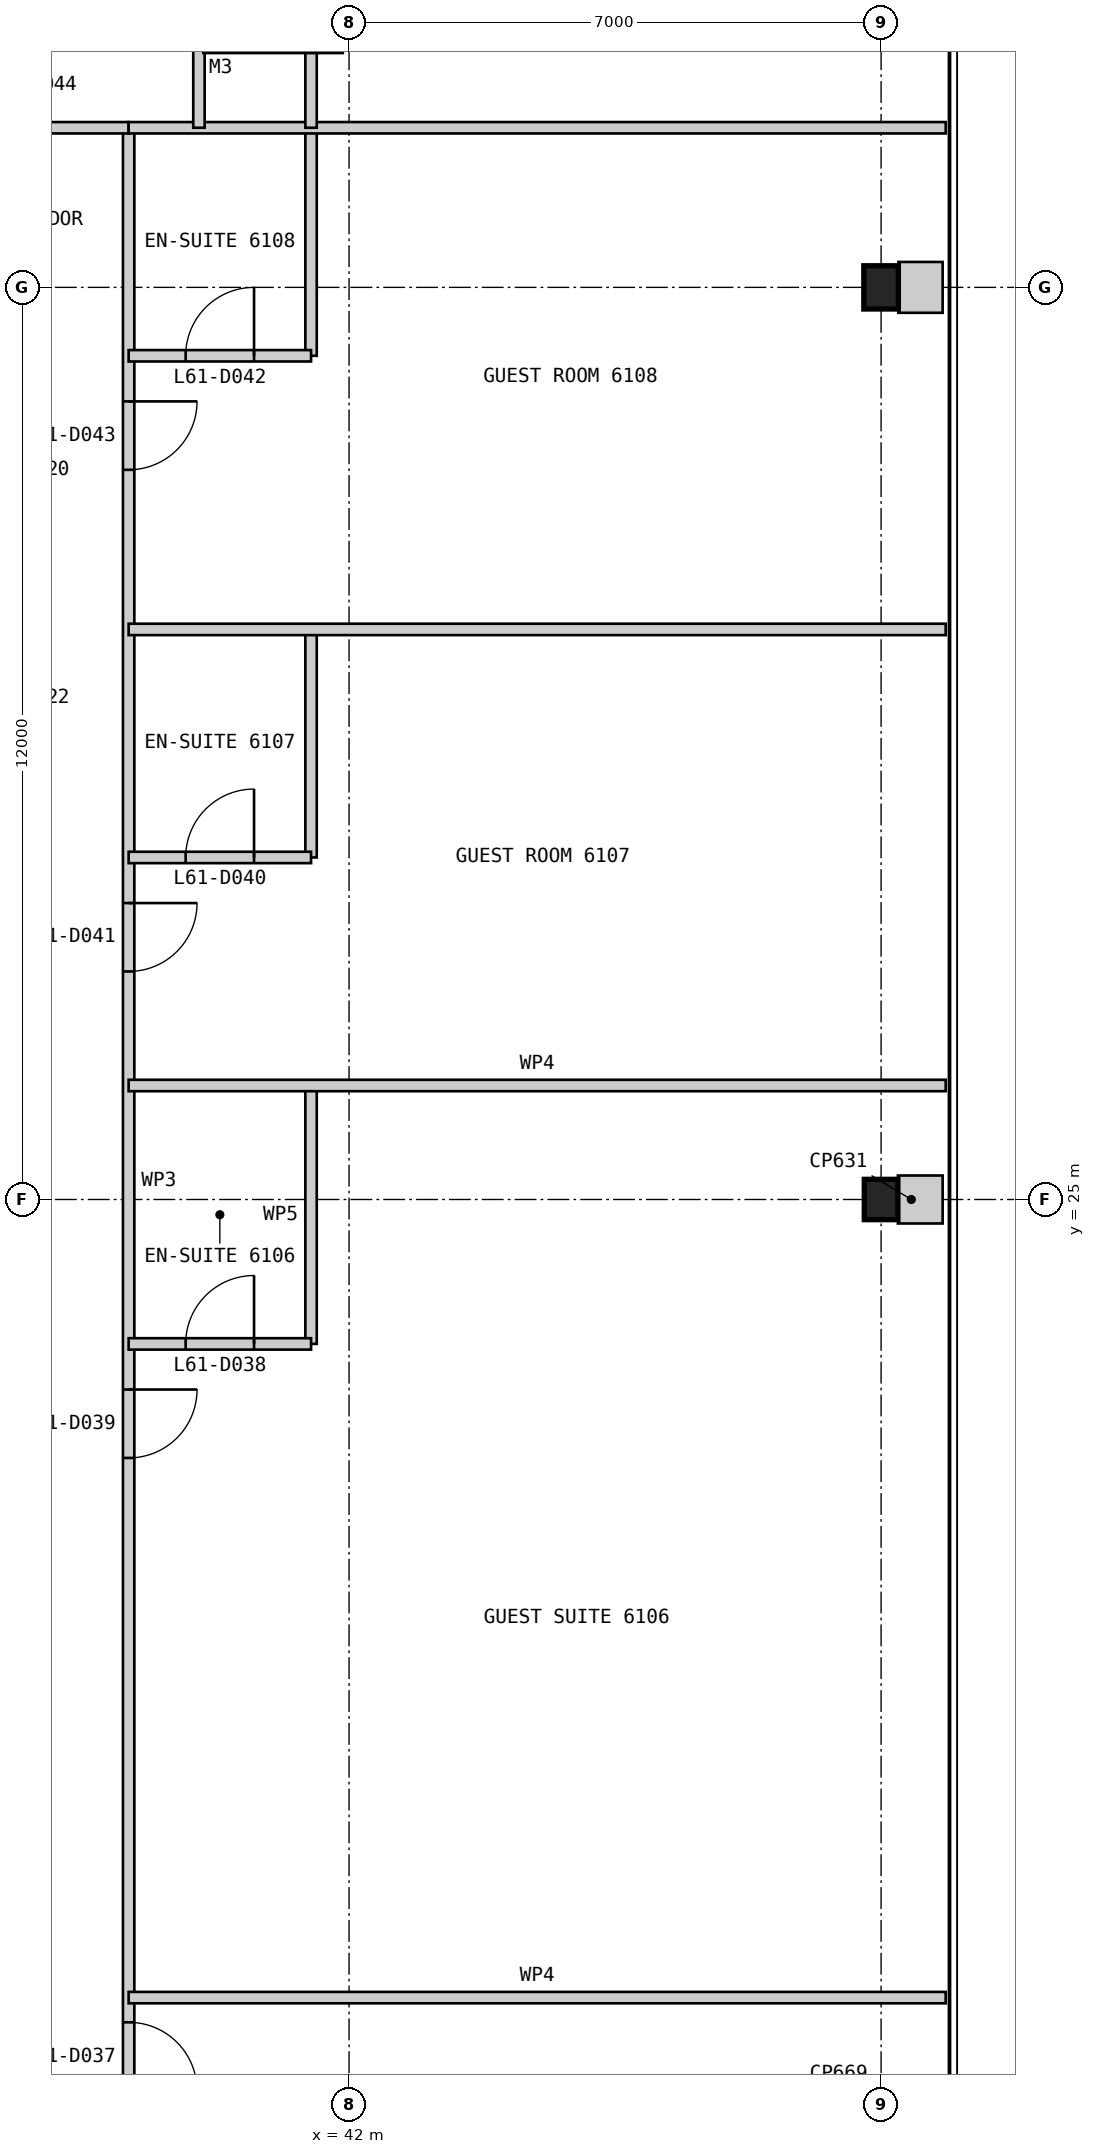
"""IFC4 building model, lengths in metres.
Left out: names, types, materials, properties, quantities, classifications, styles, units other than length and angle.
Written with IfcOpenShell. Run it as: python <this file> out.ifc"""

import sys

from ifc_helpers import new_model, si_unit, direction, frame, frame_2d, origin, origin_2d, place, context, subcontext, project, spatial, rectangle, i_section, extrude, element, fill, save


model = new_model("IFC4")
c1 = context("Model", 3, precision=1e-05, world=origin(), true_north=direction((0.0, 1.0)))
c2 = subcontext(c1, "Body", "Model", "MODEL_VIEW")
j1 = project(units=[si_unit("LENGTHUNIT", "METRE"), si_unit("PLANEANGLEUNIT", "RADIAN")], contexts=[c1])
p1 = place(None, origin())
s1 = spatial("IfcSite", under=j1, at=p1, CompositionType="ELEMENT")
p2 = place(p1, origin())
s2 = spatial("IfcBuilding", under=s1, at=p2, CompositionType="ELEMENT")
p3 = place(p2, frame((0.0, 0.0, 259.4)))
s3 = spatial("IfcBuildingStorey", under=s2, at=p3, CompositionType="ELEMENT", Elevation=259.4)
p4 = place(p3, frame((41.0, 41.0, 0.0), z_axis=(0.0, 0.0, 1.0), x_axis=(1.0, 0.0, 0.0)))
e1 = element("IfcColumn", 1, at=p4, inside=s3, PredefinedType="COLUMN", context=c2, shape_type="SweptSolid", body=[
    extrude(rectangle(XDim=1.8, YDim=1.8, at=origin_2d()), origin(), (0.0, 0.0, 1.0), 3.4),
])
p5 = place(p3, frame((49.0, 25.0, 0.0), z_axis=(0.0, 0.0, 1.0), x_axis=(1.0, 0.0, 0.0)))
e2 = element("IfcColumn", 2, at=p5, inside=s3, PredefinedType="COLUMN", context=c2, shape_type="SweptSolid", body=[
    extrude(i_section(OverallWidth=0.442, OverallDepth=0.531, WebThickness=0.066, FlangeThickness=0.106, at=origin_2d()), origin(), (0.0, 0.0, 1.0), 3.4),
])
p6 = place(p3, frame((49.0, 37.0, 0.0), z_axis=(0.0, 0.0, 1.0), x_axis=(1.0, 0.0, 0.0)))
e3 = element("IfcColumn", 3, at=p6, inside=s3, PredefinedType="COLUMN", context=c2, shape_type="SweptSolid", body=[
    extrude(i_section(OverallWidth=0.455, OverallDepth=0.569, WebThickness=0.078, FlangeThickness=0.125, at=origin_2d()), origin(), (0.0, 0.0, 1.0), 3.4),
])
p7 = place(p3, frame((39.1, 10.9, 0.0), z_axis=(0.0, 0.0, 1.0), x_axis=(0.0, 1.0, 0.0)))
e4 = element("IfcWall", 4, at=p7, inside=s3, PredefinedType="PARTITIONING", context=c2, shape_type="SweptSolid", body=[
    extrude(rectangle(XDim=28.2, YDim=0.15, at=frame_2d((14.1, 0.0))), origin(), (0.0, 0.0, 1.0), 3.25),
])
p8 = place(p7, frame((2.375, 0.0, 0.0)))
e5 = element("IfcOpeningElement", 5, at=p8, cuts=e4, PredefinedType="OPENING", context=c2, shape_type="SweptSolid", body=[
    extrude(rectangle(XDim=0.9, YDim=2.1, at=frame_2d((0.45, 1.05))), frame((0.0, 0.085, 0.0), z_axis=(0.0, -1.0, 0.0), x_axis=(1.0, 0.0, 0.0)), (0.0, 0.0, 1.0), 0.17),
])
p9 = place(p7, frame((10.7, 0.0, 0.0)))
e6 = element("IfcOpeningElement", 6, at=p9, cuts=e4, PredefinedType="OPENING", context=c2, shape_type="SweptSolid", body=[
    extrude(rectangle(XDim=0.9, YDim=2.1, at=frame_2d((0.45, 1.05))), frame((0.0, 0.085, 0.0), z_axis=(0.0, -1.0, 0.0), x_axis=(1.0, 0.0, 0.0)), (0.0, 0.0, 1.0), 0.17),
])
p10 = place(p7, frame((17.1, 0.0, 0.0)))
e7 = element("IfcOpeningElement", 7, at=p10, cuts=e4, PredefinedType="OPENING", context=c2, shape_type="SweptSolid", body=[
    extrude(rectangle(XDim=0.9, YDim=2.1, at=frame_2d((0.45, 1.05))), frame((0.0, 0.085, 0.0), z_axis=(0.0, -1.0, 0.0), x_axis=(1.0, 0.0, 0.0)), (0.0, 0.0, 1.0), 0.17),
])
p11 = place(p7, frame((23.7, 0.0, 0.0)))
e8 = element("IfcOpeningElement", 8, at=p11, cuts=e4, PredefinedType="OPENING", context=c2, shape_type="SweptSolid", body=[
    extrude(rectangle(XDim=0.9, YDim=2.1, at=frame_2d((0.45, 1.05))), frame((0.0, 0.085, 0.0), z_axis=(0.0, -1.0, 0.0), x_axis=(1.0, 0.0, 0.0)), (0.0, 0.0, 1.0), 0.17),
])
p12 = place(p3, frame((49.85, 14.5, 0.0), z_axis=(0.0, 0.0, 1.0), x_axis=(-1.0, 0.0, 0.0)))
e9 = element("IfcWall", 9, at=p12, inside=s3, PredefinedType="PARTITIONING", context=c2, shape_type="SweptSolid", body=[
    extrude(rectangle(XDim=10.75, YDim=0.15, at=frame_2d((5.375, 0.0))), origin(), (0.0, 0.0, 1.0), 3.25),
])
p13 = place(p3, frame((41.5, 23.1, 0.0), z_axis=(0.0, 0.0, 1.0), x_axis=(0.0, 1.0, 0.0)))
e10 = element("IfcWall", 10, at=p13, inside=s3, PredefinedType="PARTITIONING", context=c2, shape_type="SweptSolid", body=[
    extrude(rectangle(XDim=3.4, YDim=0.15, at=frame_2d((1.7, 0.0))), origin(), (0.0, 0.0, 1.0), 3.25),
])
p14 = place(p3, frame((41.5, 23.1, 0.0), z_axis=(0.0, 0.0, 1.0), x_axis=(-1.0, 0.0, 0.0)))
e11 = element("IfcWall", 11, at=p14, inside=s3, PredefinedType="PARTITIONING", context=c2, shape_type="SweptSolid", body=[
    extrude(rectangle(XDim=2.4, YDim=0.15, at=frame_2d((1.2, 0.0))), origin(), (0.0, 0.0, 1.0), 3.25),
])
p15 = place(p14, frame((0.75, 0.0, 0.0)))
e12 = element("IfcOpeningElement", 12, at=p15, cuts=e11, PredefinedType="OPENING", context=c2, shape_type="SweptSolid", body=[
    extrude(rectangle(XDim=0.9, YDim=2.1, at=frame_2d((0.45, 1.05))), frame((0.0, 0.085, 0.0), z_axis=(0.0, -1.0, 0.0), x_axis=(1.0, 0.0, 0.0)), (0.0, 0.0, 1.0), 0.17),
])
p16 = place(p3, frame((49.85, 26.5, 0.0), z_axis=(0.0, 0.0, 1.0), x_axis=(-1.0, 0.0, 0.0)))
e13 = element("IfcWall", 13, at=p16, inside=s3, PredefinedType="PARTITIONING", context=c2, shape_type="SweptSolid", body=[
    extrude(rectangle(XDim=10.75, YDim=0.15, at=frame_2d((5.375, 0.0))), origin(), (0.0, 0.0, 1.0), 3.25),
])
p17 = place(p3, frame((41.5, 29.5, 0.0), z_axis=(0.0, 0.0, 1.0), x_axis=(0.0, 1.0, 0.0)))
e14 = element("IfcWall", 14, at=p17, inside=s3, PredefinedType="PARTITIONING", context=c2, shape_type="SweptSolid", body=[
    extrude(rectangle(XDim=3.0, YDim=0.15, at=frame_2d((1.5, 0.0))), origin(), (0.0, 0.0, 1.0), 3.25),
])
p18 = place(p3, frame((41.5, 29.5, 0.0), z_axis=(0.0, 0.0, 1.0), x_axis=(-1.0, 0.0, 0.0)))
e15 = element("IfcWall", 15, at=p18, inside=s3, PredefinedType="PARTITIONING", context=c2, shape_type="SweptSolid", body=[
    extrude(rectangle(XDim=2.4, YDim=0.15, at=frame_2d((1.2, 0.0))), origin(), (0.0, 0.0, 1.0), 3.25),
])
p19 = place(p18, frame((0.75, 0.0, 0.0)))
e16 = element("IfcOpeningElement", 16, at=p19, cuts=e15, PredefinedType="OPENING", context=c2, shape_type="SweptSolid", body=[
    extrude(rectangle(XDim=0.9, YDim=2.1, at=frame_2d((0.45, 1.05))), frame((0.0, 0.085, 0.0), z_axis=(0.0, -1.0, 0.0), x_axis=(1.0, 0.0, 0.0)), (0.0, 0.0, 1.0), 0.17),
])
p20 = place(p3, frame((49.85, 32.5, 0.0), z_axis=(0.0, 0.0, 1.0), x_axis=(-1.0, 0.0, 0.0)))
e17 = element("IfcWall", 17, at=p20, inside=s3, PredefinedType="PARTITIONING", context=c2, shape_type="SweptSolid", body=[
    extrude(rectangle(XDim=10.75, YDim=0.15, at=frame_2d((5.375, 0.0))), origin(), (0.0, 0.0, 1.0), 3.25),
])
p21 = place(p3, frame((41.5, 36.1, 0.0), z_axis=(0.0, 0.0, 1.0), x_axis=(0.0, 1.0, 0.0)))
e18 = element("IfcWall", 18, at=p21, inside=s3, PredefinedType="PARTITIONING", context=c2, shape_type="SweptSolid", body=[
    extrude(rectangle(XDim=3.0, YDim=0.15, at=frame_2d((1.5, 0.0))), origin(), (0.0, 0.0, 1.0), 3.25),
])
p22 = place(p3, frame((41.5, 36.1, 0.0), z_axis=(0.0, 0.0, 1.0), x_axis=(-1.0, 0.0, 0.0)))
e19 = element("IfcWall", 19, at=p22, inside=s3, PredefinedType="PARTITIONING", context=c2, shape_type="SweptSolid", body=[
    extrude(rectangle(XDim=2.4, YDim=0.15, at=frame_2d((1.2, 0.0))), origin(), (0.0, 0.0, 1.0), 3.25),
])
p23 = place(p22, frame((0.75, 0.0, 0.0)))
e20 = element("IfcOpeningElement", 20, at=p23, cuts=e19, PredefinedType="OPENING", context=c2, shape_type="SweptSolid", body=[
    extrude(rectangle(XDim=0.9, YDim=2.1, at=frame_2d((0.45, 1.05))), frame((0.0, 0.085, 0.0), z_axis=(0.0, -1.0, 0.0), x_axis=(1.0, 0.0, 0.0)), (0.0, 0.0, 1.0), 0.17),
])
p24 = place(p3, frame((39.1, 39.1, 0.0), z_axis=(0.0, 0.0, 1.0), x_axis=(-1.0, 0.0, 0.0)))
e21 = element("IfcWall", 21, at=p24, inside=s3, PredefinedType="PARTITIONING", context=c2, shape_type="SweptSolid", body=[
    extrude(rectangle(XDim=28.2, YDim=0.15, at=frame_2d((14.1, 0.0))), origin(), (0.0, 0.0, 1.0), 3.25),
])
p25 = place(p24, frame((2.375, 0.0, 0.0)))
e22 = element("IfcOpeningElement", 22, at=p25, cuts=e21, PredefinedType="OPENING", context=c2, shape_type="SweptSolid", body=[
    extrude(rectangle(XDim=0.9, YDim=2.1, at=frame_2d((0.45, 1.05))), frame((0.0, 0.085, 0.0), z_axis=(0.0, -1.0, 0.0), x_axis=(1.0, 0.0, 0.0)), (0.0, 0.0, 1.0), 0.17),
])
p26 = place(p24, frame((10.7, 0.0, 0.0)))
e23 = element("IfcOpeningElement", 23, at=p26, cuts=e21, PredefinedType="OPENING", context=c2, shape_type="SweptSolid", body=[
    extrude(rectangle(XDim=0.9, YDim=2.1, at=frame_2d((0.45, 1.05))), frame((0.0, 0.085, 0.0), z_axis=(0.0, -1.0, 0.0), x_axis=(1.0, 0.0, 0.0)), (0.0, 0.0, 1.0), 0.17),
])
p27 = place(p24, frame((17.1, 0.0, 0.0)))
e24 = element("IfcOpeningElement", 24, at=p27, cuts=e21, PredefinedType="OPENING", context=c2, shape_type="SweptSolid", body=[
    extrude(rectangle(XDim=0.9, YDim=2.1, at=frame_2d((0.45, 1.05))), frame((0.0, 0.085, 0.0), z_axis=(0.0, -1.0, 0.0), x_axis=(1.0, 0.0, 0.0)), (0.0, 0.0, 1.0), 0.17),
])
p28 = place(p24, frame((23.4, 0.0, 0.0)))
e25 = element("IfcOpeningElement", 25, at=p28, cuts=e21, PredefinedType="OPENING", context=c2, shape_type="SweptSolid", body=[
    extrude(rectangle(XDim=1.0, YDim=2.1, at=frame_2d((0.5, 1.05))), frame((0.0, 0.085, 0.0), z_axis=(0.0, -1.0, 0.0), x_axis=(1.0, 0.0, 0.0)), (0.0, 0.0, 1.0), 0.17),
])
p29 = place(p3, frame((49.85, 39.1, 0.0), z_axis=(0.0, 0.0, 1.0), x_axis=(-1.0, 0.0, 0.0)))
e26 = element("IfcWall", 26, at=p29, inside=s3, PredefinedType="PARTITIONING", context=c2, shape_type="SweptSolid", body=[
    extrude(rectangle(XDim=10.75, YDim=0.15, at=frame_2d((5.375, 0.0))), origin(), (0.0, 0.0, 1.0), 3.25),
])
p30 = place(p3, frame((40.025, 41.5, 0.0), z_axis=(0.0, 0.0, 1.0), x_axis=(0.0, -1.0, 0.0)))
e27 = element("IfcWall", 27, at=p30, inside=s3, PredefinedType="PARTITIONING", context=c2, shape_type="SweptSolid", body=[
    extrude(rectangle(XDim=2.4, YDim=0.15, at=frame_2d((1.2, 0.0))), origin(), (0.0, 0.0, 1.0), 3.25),
])
p31 = place(p3, frame((41.5, 49.85, 0.0), z_axis=(0.0, 0.0, 1.0), x_axis=(0.0, -1.0, 0.0)))
e28 = element("IfcWall", 28, at=p31, inside=s3, PredefinedType="PARTITIONING", context=c2, shape_type="SweptSolid", body=[
    extrude(rectangle(XDim=10.75, YDim=0.15, at=frame_2d((5.375, 0.0))), origin(), (0.0, 0.0, 1.0), 3.25),
])
p32 = place(p31, frame((5.0, 0.0, 0.0)))
e29 = element("IfcOpeningElement", 29, at=p32, cuts=e28, PredefinedType="OPENING", context=c2, shape_type="SweptSolid", body=[
    extrude(rectangle(XDim=0.9, YDim=2.1, at=frame_2d((0.45, 1.05))), frame((0.0, 0.085, 0.0), z_axis=(0.0, -1.0, 0.0), x_axis=(1.0, 0.0, 0.0)), (0.0, 0.0, 1.0), 0.17),
])
p33 = place(p3, frame((49.81, 25.0, 0.0), z_axis=(0.0, 0.0, 1.0), x_axis=(-1.0, 0.0, 0.0)))
e30 = element("IfcWall", 30, at=p33, inside=s3, PredefinedType="PARTITIONING", context=c2, shape_type="SweptSolid", body=[
    extrude(rectangle(XDim=0.589, YDim=0.631, at=frame_2d((0.294, 0.0))), origin(), (0.0, 0.0, 1.0), 3.25),
])
p34 = place(p3, frame((49.81, 37.0, 0.0), z_axis=(0.0, 0.0, 1.0), x_axis=(-1.0, 0.0, 0.0)))
e31 = element("IfcWall", 31, at=p34, inside=s3, PredefinedType="PARTITIONING", context=c2, shape_type="SweptSolid", body=[
    extrude(rectangle(XDim=0.583, YDim=0.669, at=frame_2d((0.292, 0.0))), origin(), (0.0, 0.0, 1.0), 3.25),
])
p35 = place(p8, frame((0.9, 0.0, 0.0), z_axis=(0.0, 0.0, 1.0), x_axis=(-1.0, 0.0, 0.0)))
e32 = element("IfcDoor", 32, at=p35, inside=s3, OperationType="SINGLE_SWING_RIGHT", PredefinedType="DOOR", context=c2, shape_type="SweptSolid", body=[
    extrude(rectangle(XDim=0.9, YDim=2.1, at=frame_2d((0.45, 1.05))), frame((0.0, 0.025, 0.0), z_axis=(0.0, -1.0, 0.0), x_axis=(1.0, 0.0, 0.0)), (0.0, 0.0, 1.0), 0.05),
])
fill(e5, e32)
p36 = place(p15, frame((0.9, 0.0, 0.0), z_axis=(0.0, 0.0, 1.0), x_axis=(-1.0, 0.0, 0.0)))
e33 = element("IfcDoor", 33, at=p36, inside=s3, OperationType="SINGLE_SWING_RIGHT", PredefinedType="DOOR", context=c2, shape_type="SweptSolid", body=[
    extrude(rectangle(XDim=0.9, YDim=2.1, at=frame_2d((0.45, 1.05))), frame((0.0, 0.025, 0.0), z_axis=(0.0, -1.0, 0.0), x_axis=(1.0, 0.0, 0.0)), (0.0, 0.0, 1.0), 0.05),
])
fill(e12, e33)
p37 = place(p9, frame((0.9, 0.0, 0.0), z_axis=(0.0, 0.0, 1.0), x_axis=(-1.0, 0.0, 0.0)))
e34 = element("IfcDoor", 34, at=p37, inside=s3, OperationType="SINGLE_SWING_LEFT", PredefinedType="DOOR", context=c2, shape_type="SweptSolid", body=[
    extrude(rectangle(XDim=0.9, YDim=2.1, at=frame_2d((0.45, 1.05))), frame((0.0, 0.025, 0.0), z_axis=(0.0, -1.0, 0.0), x_axis=(1.0, 0.0, 0.0)), (0.0, 0.0, 1.0), 0.05),
])
fill(e6, e34)
p38 = place(p19, frame((0.9, 0.0, 0.0), z_axis=(0.0, 0.0, 1.0), x_axis=(-1.0, 0.0, 0.0)))
e35 = element("IfcDoor", 35, at=p38, inside=s3, OperationType="SINGLE_SWING_RIGHT", PredefinedType="DOOR", context=c2, shape_type="SweptSolid", body=[
    extrude(rectangle(XDim=0.9, YDim=2.1, at=frame_2d((0.45, 1.05))), frame((0.0, 0.025, 0.0), z_axis=(0.0, -1.0, 0.0), x_axis=(1.0, 0.0, 0.0)), (0.0, 0.0, 1.0), 0.05),
])
fill(e16, e35)
p39 = place(p10, frame((0.9, 0.0, 0.0), z_axis=(0.0, 0.0, 1.0), x_axis=(-1.0, 0.0, 0.0)))
e36 = element("IfcDoor", 36, at=p39, inside=s3, OperationType="SINGLE_SWING_LEFT", PredefinedType="DOOR", context=c2, shape_type="SweptSolid", body=[
    extrude(rectangle(XDim=0.9, YDim=2.1, at=frame_2d((0.45, 1.05))), frame((0.0, 0.025, 0.0), z_axis=(0.0, -1.0, 0.0), x_axis=(1.0, 0.0, 0.0)), (0.0, 0.0, 1.0), 0.05),
])
fill(e7, e36)
p40 = place(p23, frame((0.9, 0.0, 0.0), z_axis=(0.0, 0.0, 1.0), x_axis=(-1.0, 0.0, 0.0)))
e37 = element("IfcDoor", 37, at=p40, inside=s3, OperationType="SINGLE_SWING_RIGHT", PredefinedType="DOOR", context=c2, shape_type="SweptSolid", body=[
    extrude(rectangle(XDim=0.9, YDim=2.1, at=frame_2d((0.45, 1.05))), frame((0.0, 0.025, 0.0), z_axis=(0.0, -1.0, 0.0), x_axis=(1.0, 0.0, 0.0)), (0.0, 0.0, 1.0), 0.05),
])
fill(e20, e37)
p41 = place(p11, frame((0.9, 0.0, 0.0), z_axis=(0.0, 0.0, 1.0), x_axis=(-1.0, 0.0, 0.0)))
e38 = element("IfcDoor", 38, at=p41, inside=s3, OperationType="SINGLE_SWING_LEFT", PredefinedType="DOOR", context=c2, shape_type="SweptSolid", body=[
    extrude(rectangle(XDim=0.9, YDim=2.1, at=frame_2d((0.45, 1.05))), frame((0.0, 0.025, 0.0), z_axis=(0.0, -1.0, 0.0), x_axis=(1.0, 0.0, 0.0)), (0.0, 0.0, 1.0), 0.05),
])
fill(e8, e38)
save(model, sys.argv[1])
